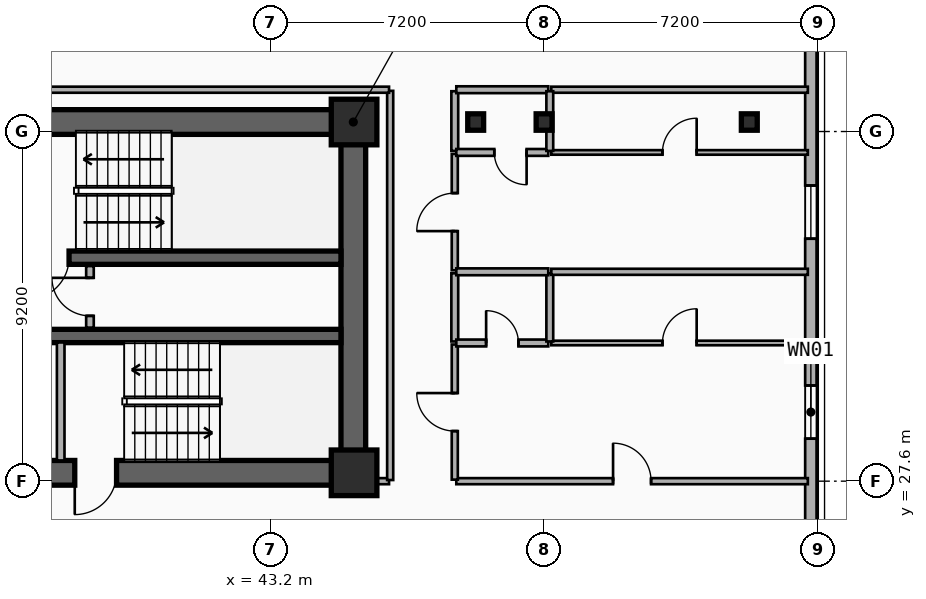
"""IFC4 building model, lengths in metres.
Left out: names, types, materials, properties, quantities, classifications, styles, units other than length and angle.
Written with IfcOpenShell. Run it as: python <this file> out.ifc"""

import sys

from ifc_helpers import new_model, si_unit, direction, frame, frame_2d, origin, origin_2d, place, context, subcontext, project, spatial, rectangle, i_section, extrude, element, fill, save


model = new_model("IFC4")
c1 = context("Model", 3, precision=1e-05, world=origin(), true_north=direction((0.0, 1.0)))
c2 = subcontext(c1, "Body", "Model", "MODEL_VIEW")
j1 = project(units=[si_unit("LENGTHUNIT", "METRE"), si_unit("PLANEANGLEUNIT", "RADIAN")], contexts=[c1])
p1 = place(None, origin())
s1 = spatial("IfcSite", under=j1, at=p1, CompositionType="ELEMENT")
p2 = place(p1, origin())
s2 = spatial("IfcBuilding", under=s1, at=p2, CompositionType="ELEMENT")
p3 = place(p2, frame((0.0, 0.0, 97.8)))
s3 = spatial("IfcBuildingStorey", under=s2, at=p3, CompositionType="ELEMENT", Elevation=97.8)
p4 = place(p3, frame((12.15, 37.05, 0.0), z_axis=(0.0, 0.0, 1.0), x_axis=(1.0, 0.0, 0.0)))
e1 = element("IfcWall", 1, at=p4, inside=s3, PredefinedType="SHEAR", context=c2, shape_type="SweptSolid", body=[
    extrude(rectangle(XDim=33.23, YDim=0.65, at=frame_2d((16.615, 0.0))), origin(), (0.0, 0.0, 1.0), 3.5),
])
p5 = place(p3, frame((45.38, 27.82, 0.0), z_axis=(0.0, 0.0, 1.0), x_axis=(-1.0, 0.0, 0.0)))
e2 = element("IfcWall", 2, at=p5, inside=s3, PredefinedType="SHEAR", context=c2, shape_type="SweptSolid", body=[
    extrude(rectangle(XDim=12.23, YDim=0.65, at=frame_2d((6.115, 0.0))), origin(), (0.0, 0.0, 1.0), 3.5),
])
p6 = place(p5, frame((9.93, 0.0, 0.0)))
e3 = element("IfcOpeningElement", 3, at=p6, cuts=e2, PredefinedType="OPENING", context=c2, shape_type="SweptSolid", body=[
    extrude(rectangle(XDim=1.1, YDim=2.15, at=frame_2d((0.55, 1.075))), frame((0.0, 0.335, 0.0), z_axis=(0.0, -1.0, 0.0), x_axis=(1.0, 0.0, 0.0)), (0.0, 0.0, 1.0), 0.67),
])
p7 = place(p5, frame((6.23, 0.0, 0.0)))
e4 = element("IfcOpeningElement", 4, at=p7, cuts=e2, PredefinedType="OPENING", context=c2, shape_type="SweptSolid", body=[
    extrude(rectangle(XDim=1.1, YDim=2.15, at=frame_2d((0.55, 1.075))), frame((0.0, 0.335, 0.0), z_axis=(0.0, -1.0, 0.0), x_axis=(1.0, 0.0, 0.0)), (0.0, 0.0, 1.0), 0.67),
])
p8 = place(p3, frame((45.38, 28.145, 0.0), z_axis=(0.0, 0.0, 1.0), x_axis=(0.0, 1.0, 0.0)))
e5 = element("IfcWall", 5, at=p8, inside=s3, PredefinedType="SHEAR", context=c2, shape_type="SweptSolid", body=[
    extrude(rectangle(XDim=8.58, YDim=0.65, at=frame_2d((4.29, 0.0))), origin(), (0.0, 0.0, 1.0), 3.5),
])
p9 = place(p3, frame((45.055, 33.48, 0.0), z_axis=(0.0, 0.0, 1.0), x_axis=(-1.0, 0.0, 0.0)))
e6 = element("IfcWall", 6, at=p9, inside=s3, PredefinedType="SHEAR", context=c2, shape_type="SweptSolid", body=[
    extrude(rectangle(XDim=8.5, YDim=0.35, at=frame_2d((4.25, 0.0))), origin(), (0.0, 0.0, 1.0), 3.5),
])
p10 = place(p9, frame((7.155, 0.0, 0.0)))
e7 = element("IfcOpeningElement", 7, at=p10, cuts=e6, PredefinedType="OPENING", context=c2, shape_type="SweptSolid", body=[
    extrude(rectangle(XDim=1.1, YDim=2.15, at=frame_2d((0.55, 1.075))), frame((0.0, 0.185, 0.0), z_axis=(0.0, -1.0, 0.0), x_axis=(1.0, 0.0, 0.0)), (0.0, 0.0, 1.0), 0.37),
])
p11 = place(p3, frame((36.555, 31.42, 0.0), z_axis=(0.0, 0.0, 1.0), x_axis=(1.0, 0.0, 0.0)))
e8 = element("IfcWall", 8, at=p11, inside=s3, PredefinedType="SHEAR", context=c2, shape_type="SweptSolid", body=[
    extrude(rectangle(XDim=8.5, YDim=0.35, at=frame_2d((4.25, 0.0))), origin(), (0.0, 0.0, 1.0), 3.5),
])
for number, where, z_axis, x_axis in (
    (9, (45.4, 27.82, 0.0), (0.0, 0.0, 1.0), (1.0, 0.0, 0.0)),
    (10, (45.4, 37.05, 0.0), (0.0, 0.0, 1.0), (1.0, 0.0, 0.0)),
):
    element("IfcColumn", number, at=place(p3, frame(where, z_axis=z_axis, x_axis=x_axis)), inside=s3, PredefinedType="COLUMN", context=c2, shape_type="SweptSolid", body=[
        extrude(rectangle(XDim=1.2, YDim=1.2, at=origin_2d()), origin(), (0.0, 0.0, 1.0), 3.5),
    ])
for number, where, z_axis, x_axis in (
    (11, (48.6, 37.05, 0.0), (0.0, 0.0, 1.0), (1.0, 0.0, 0.0)),
    (12, (50.4, 37.05, 0.0), (0.0, 0.0, 1.0), (1.0, 0.0, 0.0)),
    (13, (55.8, 37.05, 0.0), (0.0, 0.0, 1.0), (1.0, 0.0, 0.0)),
):
    element("IfcColumn", number, at=place(p3, frame(where, z_axis=z_axis, x_axis=x_axis)), inside=s3, PredefinedType="COLUMN", context=c2, shape_type="SweptSolid", body=[
        extrude(i_section(OverallWidth=0.418, OverallDepth=0.432, WebThickness=0.035, FlangeThickness=0.056, FilletRadius=0.015, at=origin_2d()), origin(), (0.0, 0.0, 1.0), 3.5),
    ])
p12 = place(p3, frame((57.42, 39.0, 0.0), z_axis=(0.0, 0.0, 1.0), x_axis=(0.0, -1.0, 0.0)))
e14 = element("IfcWall", 14, at=p12, inside=s3, PredefinedType="SOLIDWALL", context=c2, shape_type="SweptSolid", body=[
    extrude(rectangle(XDim=18.0, YDim=0.3, at=frame_2d((9.0, 0.0))), origin(), (0.0, 0.0, 1.0), 3.24),
])
p13 = place(p12, frame((8.882, 0.0, 0.48)))
e15 = element("IfcOpeningElement", 15, at=p13, cuts=e14, PredefinedType="OPENING", context=c2, shape_type="SweptSolid", body=[
    extrude(rectangle(XDim=1.4, YDim=1.8, at=frame_2d((0.7, 0.9))), frame((0.0, 0.16, 0.0), z_axis=(0.0, -1.0, 0.0), x_axis=(1.0, 0.0, 0.0)), (0.0, 0.0, 1.0), 0.32),
])
p14 = place(p12, frame((3.621, 0.0, 0.48)))
e16 = element("IfcOpeningElement", 16, at=p14, cuts=e14, PredefinedType="OPENING", context=c2, shape_type="SweptSolid", body=[
    extrude(rectangle(XDim=1.4, YDim=1.8, at=frame_2d((0.7, 0.9))), frame((0.0, 0.16, 0.0), z_axis=(0.0, -1.0, 0.0), x_axis=(1.0, 0.0, 0.0)), (0.0, 0.0, 1.0), 0.32),
])
p15 = place(p12, frame((16.28, 0.0, 0.65)))
e17 = element("IfcOpeningElement", 17, at=p15, cuts=e14, PredefinedType="OPENING", context=c2, shape_type="SweptSolid", body=[
    extrude(rectangle(XDim=1.4, YDim=1.8, at=frame_2d((0.7, 0.9))), frame((0.0, 0.16, 0.0), z_axis=(0.0, -1.0, 0.0), x_axis=(1.0, 0.0, 0.0)), (0.0, 0.0, 1.0), 0.32),
])
p16 = place(p3, frame((37.68, 28.145, 0.0), z_axis=(0.0, 0.0, 1.0), x_axis=(0.0, 1.0, 0.0)))
e18 = element("IfcWall", 18, at=p16, inside=s3, PredefinedType="PARTITIONING", context=c2, shape_type="SweptSolid", body=[
    extrude(rectangle(XDim=3.105, YDim=0.2, at=frame_2d((1.552, 0.0))), origin(), (0.0, 0.0, 1.0), 2.62),
])
p17 = place(p3, frame((38.45, 31.64, 0.0), z_axis=(0.0, 0.0, 1.0), x_axis=(0.0, 1.0, 0.0)))
e19 = element("IfcWall", 19, at=p17, inside=s3, PredefinedType="PARTITIONING", context=c2, shape_type="SweptSolid", body=[
    extrude(rectangle(XDim=1.62, YDim=0.2, at=frame_2d((0.81, 0.0))), origin(), (0.0, 0.0, 1.0), 3.24),
])
p18 = place(p17, frame((0.31, 0.0, 0.0)))
e20 = element("IfcOpeningElement", 20, at=p18, cuts=e19, PredefinedType="OPENING", context=c2, shape_type="SweptSolid", body=[
    extrude(rectangle(XDim=1.0, YDim=2.15, at=frame_2d((0.5, 1.075))), frame((0.0, 0.11, 0.0), z_axis=(0.0, -1.0, 0.0), x_axis=(1.0, 0.0, 0.0)), (0.0, 0.0, 1.0), 0.22),
])
p19 = place(p3, frame((48.09, 27.6, 0.0), z_axis=(0.0, 0.0, 1.0), x_axis=(1.0, 0.0, 0.0)))
e21 = element("IfcWall", 21, at=p19, inside=s3, PredefinedType="PARTITIONING", context=c2, shape_type="SweptSolid", body=[
    extrude(rectangle(XDim=9.25, YDim=0.16, at=frame_2d((4.625, 0.0))), origin(), (0.0, 0.0, 1.0), 2.57),
])
p20 = place(p19, frame((4.125, 0.0, 0.0)))
e22 = element("IfcOpeningElement", 22, at=p20, cuts=e21, PredefinedType="OPENING", context=c2, shape_type="SweptSolid", body=[
    extrude(rectangle(XDim=1.0, YDim=2.15, at=frame_2d((0.5, 1.075))), frame((0.0, 0.09, 0.0), z_axis=(0.0, -1.0, 0.0), x_axis=(1.0, 0.0, 0.0)), (0.0, 0.0, 1.0), 0.18),
])
p21 = place(p3, frame((48.05, 27.64, 0.0), z_axis=(0.0, 0.0, 1.0), x_axis=(0.0, 1.0, 0.0)))
e23 = element("IfcWall", 23, at=p21, inside=s3, PredefinedType="PARTITIONING", context=c2, shape_type="SweptSolid", body=[
    extrude(rectangle(XDim=3.556, YDim=0.16, at=frame_2d((1.778, 0.0))), origin(), (0.0, 0.0, 1.0), 3.24),
])
p22 = place(p21, frame((1.278, 0.0, 0.0)))
e24 = element("IfcOpeningElement", 24, at=p22, cuts=e23, PredefinedType="OPENING", context=c2, shape_type="SweptSolid", body=[
    extrude(rectangle(XDim=1.0, YDim=2.15, at=frame_2d((0.5, 1.075))), frame((0.0, 0.09, 0.0), z_axis=(0.0, -1.0, 0.0), x_axis=(1.0, 0.0, 0.0)), (0.0, 0.0, 1.0), 0.18),
])
p23 = place(p3, frame((48.05, 31.276, 0.0), z_axis=(0.0, 0.0, 1.0), x_axis=(0.0, 1.0, 0.0)))
e25 = element("IfcWall", 25, at=p23, inside=s3, PredefinedType="PLUMBINGWALL", context=c2, shape_type="SweptSolid", body=[
    extrude(rectangle(XDim=1.793, YDim=0.18, at=frame_2d((0.896, 0.0))), origin(), (0.0, 0.0, 1.0), 3.24),
])
p24 = place(p3, frame((48.05, 33.149, 0.0), z_axis=(0.0, 0.0, 1.0), x_axis=(0.0, 1.0, 0.0)))
e26 = element("IfcWall", 26, at=p24, inside=s3, PredefinedType="PARTITIONING", context=c2, shape_type="SweptSolid", body=[
    extrude(rectangle(XDim=3.061, YDim=0.16, at=frame_2d((1.531, 0.0))), origin(), (0.0, 0.0, 1.0), 3.24),
])
p25 = place(p24, frame((1.031, 0.0, 0.0)))
e27 = element("IfcOpeningElement", 27, at=p25, cuts=e26, PredefinedType="OPENING", context=c2, shape_type="SweptSolid", body=[
    extrude(rectangle(XDim=1.0, YDim=2.15, at=frame_2d((0.5, 1.075))), frame((0.0, 0.09, 0.0), z_axis=(0.0, -1.0, 0.0), x_axis=(1.0, 0.0, 0.0)), (0.0, 0.0, 1.0), 0.18),
])
p26 = place(p3, frame((48.05, 36.29, 0.0), z_axis=(0.0, 0.0, 1.0), x_axis=(0.0, 1.0, 0.0)))
e28 = element("IfcWall", 28, at=p26, inside=s3, PredefinedType="PLUMBINGWALL", context=c2, shape_type="SweptSolid", body=[
    extrude(rectangle(XDim=1.57, YDim=0.18, at=frame_2d((0.785, 0.0))), origin(), (0.0, 0.0, 1.0), 2.72),
])
p27 = place(p3, frame((48.09, 37.9, 0.0), z_axis=(0.0, 0.0, 1.0), x_axis=(1.0, 0.0, 0.0)))
e29 = element("IfcWall", 29, at=p27, inside=s3, PredefinedType="PLUMBINGWALL", context=c2, shape_type="SweptSolid", body=[
    extrude(rectangle(XDim=2.42, YDim=0.18, at=frame_2d((1.21, 0.0))), origin(), (0.0, 0.0, 1.0), 3.24),
])
p28 = place(p3, frame((50.59, 37.9, 0.0), z_axis=(0.0, 0.0, 1.0), x_axis=(1.0, 0.0, 0.0)))
e30 = element("IfcWall", 30, at=p28, inside=s3, PredefinedType="PARTITIONING", context=c2, shape_type="SweptSolid", body=[
    extrude(rectangle(XDim=6.75, YDim=0.16, at=frame_2d((3.375, 0.0))), origin(), (0.0, 0.0, 1.0), 3.24),
])
p29 = place(p3, frame((48.09, 31.236, 0.0), z_axis=(0.0, 0.0, 1.0), x_axis=(1.0, 0.0, 0.0)))
e31 = element("IfcWall", 31, at=p29, inside=s3, PredefinedType="PLUMBINGWALL", context=c2, shape_type="SweptSolid", body=[
    extrude(rectangle(XDim=2.42, YDim=0.18, at=frame_2d((1.21, 0.0))), origin(), (0.0, 0.0, 1.0), 2.57),
])
p30 = place(p29, frame((0.785, 0.0, 0.0)))
e32 = element("IfcOpeningElement", 32, at=p30, cuts=e31, PredefinedType="OPENING", context=c2, shape_type="SweptSolid", body=[
    extrude(rectangle(XDim=0.85, YDim=2.1, at=frame_2d((0.425, 1.05))), frame((0.0, 0.1, 0.0), z_axis=(0.0, -1.0, 0.0), x_axis=(1.0, 0.0, 0.0)), (0.0, 0.0, 1.0), 0.2),
])
p31 = place(p3, frame((50.59, 31.236, 0.0), z_axis=(0.0, 0.0, 1.0), x_axis=(1.0, 0.0, 0.0)))
e33 = element("IfcWall", 33, at=p31, inside=s3, PredefinedType="PARTITIONING", context=c2, shape_type="SweptSolid", body=[
    extrude(rectangle(XDim=6.75, YDim=0.12, at=frame_2d((3.375, 0.0))), origin(), (0.0, 0.0, 1.0), 2.57),
])
p32 = place(p31, frame((2.925, 0.0, 0.0)))
e34 = element("IfcOpeningElement", 34, at=p32, cuts=e33, PredefinedType="OPENING", context=c2, shape_type="SweptSolid", body=[
    extrude(rectangle(XDim=0.9, YDim=2.1, at=frame_2d((0.45, 1.05))), frame((0.0, 0.07, 0.0), z_axis=(0.0, -1.0, 0.0), x_axis=(1.0, 0.0, 0.0)), (0.0, 0.0, 1.0), 0.14),
])
p33 = place(p3, frame((50.55, 31.276, 0.0), z_axis=(0.0, 0.0, 1.0), x_axis=(0.0, 1.0, 0.0)))
e35 = element("IfcWall", 35, at=p33, inside=s3, PredefinedType="PLUMBINGWALL", context=c2, shape_type="SweptSolid", body=[
    extrude(rectangle(XDim=1.793, YDim=0.18, at=frame_2d((0.896, 0.0))), origin(), (0.0, 0.0, 1.0), 2.57),
])
p34 = place(p3, frame((48.09, 33.109, 0.0), z_axis=(0.0, 0.0, 1.0), x_axis=(1.0, 0.0, 0.0)))
e36 = element("IfcWall", 36, at=p34, inside=s3, PredefinedType="PLUMBINGWALL", context=c2, shape_type="SweptSolid", body=[
    extrude(rectangle(XDim=2.42, YDim=0.18, at=frame_2d((1.21, 0.0))), origin(), (0.0, 0.0, 1.0), 2.57),
])
p35 = place(p3, frame((50.59, 33.109, 0.0), z_axis=(0.0, 0.0, 1.0), x_axis=(1.0, 0.0, 0.0)))
e37 = element("IfcWall", 37, at=p35, inside=s3, PredefinedType="PARTITIONING", context=c2, shape_type="SweptSolid", body=[
    extrude(rectangle(XDim=6.75, YDim=0.16, at=frame_2d((3.375, 0.0))), origin(), (0.0, 0.0, 1.0), 2.57),
])
p36 = place(p3, frame((50.51, 36.25, 0.0), z_axis=(0.0, 0.0, 1.0), x_axis=(-1.0, 0.0, 0.0)))
e38 = element("IfcWall", 38, at=p36, inside=s3, PredefinedType="PLUMBINGWALL", context=c2, shape_type="SweptSolid", body=[
    extrude(rectangle(XDim=2.42, YDim=0.18, at=frame_2d((1.21, 0.0))), origin(), (0.0, 0.0, 1.0), 2.57),
])
p37 = place(p36, frame((0.57, 0.0, 0.0)))
e39 = element("IfcOpeningElement", 39, at=p37, cuts=e38, PredefinedType="OPENING", context=c2, shape_type="SweptSolid", body=[
    extrude(rectangle(XDim=0.85, YDim=2.1, at=frame_2d((0.425, 1.05))), frame((0.0, 0.1, 0.0), z_axis=(0.0, -1.0, 0.0), x_axis=(1.0, 0.0, 0.0)), (0.0, 0.0, 1.0), 0.2),
])
p38 = place(p3, frame((50.59, 36.25, 0.0), z_axis=(0.0, 0.0, 1.0), x_axis=(1.0, 0.0, 0.0)))
e40 = element("IfcWall", 40, at=p38, inside=s3, PredefinedType="PARTITIONING", context=c2, shape_type="SweptSolid", body=[
    extrude(rectangle(XDim=6.75, YDim=0.12, at=frame_2d((3.375, 0.0))), origin(), (0.0, 0.0, 1.0), 2.57),
])
p39 = place(p38, frame((2.925, 0.0, 0.0)))
e41 = element("IfcOpeningElement", 41, at=p39, cuts=e40, PredefinedType="OPENING", context=c2, shape_type="SweptSolid", body=[
    extrude(rectangle(XDim=0.9, YDim=2.1, at=frame_2d((0.45, 1.05))), frame((0.0, 0.07, 0.0), z_axis=(0.0, -1.0, 0.0), x_axis=(1.0, 0.0, 0.0)), (0.0, 0.0, 1.0), 0.14),
])
p40 = place(p3, frame((50.55, 36.29, 0.0), z_axis=(0.0, 0.0, 1.0), x_axis=(0.0, 1.0, 0.0)))
e42 = element("IfcWall", 42, at=p40, inside=s3, PredefinedType="PLUMBINGWALL", context=c2, shape_type="SweptSolid", body=[
    extrude(rectangle(XDim=1.57, YDim=0.18, at=frame_2d((0.785, 0.0))), origin(), (0.0, 0.0, 1.0), 2.57),
])
p41 = place(p3, frame((45.41, 27.6, 0.0), z_axis=(0.0, 0.0, 1.0), x_axis=(1.0, 0.0, 0.0)))
e43 = element("IfcWall", 43, at=p41, inside=s3, PredefinedType="PARTITIONING", context=c2, shape_type="SweptSolid", body=[
    extrude(rectangle(XDim=0.91, YDim=0.16, at=frame_2d((0.455, 0.0))), origin(), (0.0, 0.0, 1.0), 2.28),
])
p42 = place(p3, frame((46.35, 27.63, 0.0), z_axis=(0.0, 0.0, 1.0), x_axis=(0.0, 1.0, 0.0)))
e44 = element("IfcWall", 44, at=p42, inside=s3, PredefinedType="PARTITIONING", context=c2, shape_type="SweptSolid", body=[
    extrude(rectangle(XDim=10.24, YDim=0.16, at=frame_2d((5.12, 0.0))), origin(), (0.0, 0.0, 1.0), 2.72),
])
p43 = place(p3, frame((11.28, 37.9, 0.0), z_axis=(0.0, 0.0, 1.0), x_axis=(1.0, 0.0, 0.0)))
e45 = element("IfcWall", 45, at=p43, inside=s3, PredefinedType="PARTITIONING", context=c2, shape_type="SweptSolid", body=[
    extrude(rectangle(XDim=35.04, YDim=0.16, at=frame_2d((17.52, 0.0))), origin(), (0.0, 0.0, 1.0), 3.24),
])
p44 = place(p13, origin())
e46 = element("IfcWindow", 46, at=p44, inside=s3, PartitioningType="SINGLE_PANEL", PredefinedType="WINDOW", context=c2, shape_type="SweptSolid", body=[
    extrude(rectangle(XDim=1.4, YDim=1.8, at=frame_2d((0.7, 0.9))), frame((0.0, 0.03, 0.0), z_axis=(0.0, -1.0, 0.0), x_axis=(1.0, 0.0, 0.0)), (0.0, 0.0, 1.0), 0.06),
])
fill(e15, e46)
p45 = place(p14, origin())
e47 = element("IfcWindow", 47, at=p45, inside=s3, PartitioningType="SINGLE_PANEL", PredefinedType="WINDOW", context=c2, shape_type="SweptSolid", body=[
    extrude(rectangle(XDim=1.4, YDim=1.8, at=frame_2d((0.7, 0.9))), frame((0.0, 0.03, 0.0), z_axis=(0.0, -1.0, 0.0), x_axis=(1.0, 0.0, 0.0)), (0.0, 0.0, 1.0), 0.06),
])
fill(e16, e47)
p46 = place(p10, origin())
e48 = element("IfcDoor", 48, at=p46, inside=s3, OperationType="SINGLE_SWING_RIGHT", PredefinedType="DOOR", context=c2, shape_type="SweptSolid", body=[
    extrude(rectangle(XDim=1.1, YDim=2.15, at=frame_2d((0.55, 1.075))), frame((0.0, 0.025, 0.0), z_axis=(0.0, -1.0, 0.0), x_axis=(1.0, 0.0, 0.0)), (0.0, 0.0, 1.0), 0.05),
])
fill(e7, e48)
p47 = place(p7, origin())
e49 = element("IfcDoor", 49, at=p47, inside=s3, OperationType="SINGLE_SWING_RIGHT", PredefinedType="DOOR", context=c2, shape_type="SweptSolid", body=[
    extrude(rectangle(XDim=1.1, YDim=2.15, at=frame_2d((0.55, 1.075))), frame((0.0, 0.025, 0.0), z_axis=(0.0, -1.0, 0.0), x_axis=(1.0, 0.0, 0.0)), (0.0, 0.0, 1.0), 0.05),
])
fill(e4, e49)
p48 = place(p18, origin())
e50 = element("IfcDoor", 50, at=p48, inside=s3, OperationType="SINGLE_SWING_RIGHT", PredefinedType="DOOR", context=c2, shape_type="SweptSolid", body=[
    extrude(rectangle(XDim=1.0, YDim=2.15, at=frame_2d((0.5, 1.075))), frame((0.0, 0.025, 0.0), z_axis=(0.0, -1.0, 0.0), x_axis=(1.0, 0.0, 0.0)), (0.0, 0.0, 1.0), 0.05),
])
fill(e20, e50)
p49 = place(p20, origin())
e51 = element("IfcDoor", 51, at=p49, inside=s3, OperationType="SINGLE_SWING_LEFT", PredefinedType="DOOR", context=c2, shape_type="SweptSolid", body=[
    extrude(rectangle(XDim=1.0, YDim=2.15, at=frame_2d((0.5, 1.075))), frame((0.0, 0.025, 0.0), z_axis=(0.0, -1.0, 0.0), x_axis=(1.0, 0.0, 0.0)), (0.0, 0.0, 1.0), 0.05),
])
fill(e22, e51)
p50 = place(p22, origin())
e52 = element("IfcDoor", 52, at=p50, inside=s3, OperationType="SINGLE_SWING_RIGHT", PredefinedType="DOOR", context=c2, shape_type="SweptSolid", body=[
    extrude(rectangle(XDim=1.0, YDim=2.15, at=frame_2d((0.5, 1.075))), frame((0.0, 0.025, 0.0), z_axis=(0.0, -1.0, 0.0), x_axis=(1.0, 0.0, 0.0)), (0.0, 0.0, 1.0), 0.05),
])
fill(e24, e52)
p51 = place(p25, origin())
e53 = element("IfcDoor", 53, at=p51, inside=s3, OperationType="SINGLE_SWING_LEFT", PredefinedType="DOOR", context=c2, shape_type="SweptSolid", body=[
    extrude(rectangle(XDim=1.0, YDim=2.15, at=frame_2d((0.5, 1.075))), frame((0.0, 0.025, 0.0), z_axis=(0.0, -1.0, 0.0), x_axis=(1.0, 0.0, 0.0)), (0.0, 0.0, 1.0), 0.05),
])
fill(e27, e53)
p52 = place(p30, origin())
e54 = element("IfcDoor", 54, at=p52, inside=s3, OperationType="SINGLE_SWING_LEFT", PredefinedType="DOOR", context=c2, shape_type="SweptSolid", body=[
    extrude(rectangle(XDim=0.85, YDim=2.1, at=frame_2d((0.425, 1.05))), frame((0.0, 0.025, 0.0), z_axis=(0.0, -1.0, 0.0), x_axis=(1.0, 0.0, 0.0)), (0.0, 0.0, 1.0), 0.05),
])
fill(e32, e54)
p53 = place(p32, origin())
e55 = element("IfcDoor", 55, at=p53, inside=s3, OperationType="SINGLE_SWING_RIGHT", PredefinedType="DOOR", context=c2, shape_type="SweptSolid", body=[
    extrude(rectangle(XDim=0.9, YDim=2.1, at=frame_2d((0.45, 1.05))), frame((0.0, 0.025, 0.0), z_axis=(0.0, -1.0, 0.0), x_axis=(1.0, 0.0, 0.0)), (0.0, 0.0, 1.0), 0.05),
])
fill(e34, e55)
p54 = place(p37, origin())
e56 = element("IfcDoor", 56, at=p54, inside=s3, OperationType="SINGLE_SWING_LEFT", PredefinedType="DOOR", context=c2, shape_type="SweptSolid", body=[
    extrude(rectangle(XDim=0.85, YDim=2.1, at=frame_2d((0.425, 1.05))), frame((0.0, 0.025, 0.0), z_axis=(0.0, -1.0, 0.0), x_axis=(1.0, 0.0, 0.0)), (0.0, 0.0, 1.0), 0.05),
])
fill(e39, e56)
p55 = place(p39, origin())
e57 = element("IfcDoor", 57, at=p55, inside=s3, OperationType="SINGLE_SWING_RIGHT", PredefinedType="DOOR", context=c2, shape_type="SweptSolid", body=[
    extrude(rectangle(XDim=0.9, YDim=2.1, at=frame_2d((0.45, 1.05))), frame((0.0, 0.025, 0.0), z_axis=(0.0, -1.0, 0.0), x_axis=(1.0, 0.0, 0.0)), (0.0, 0.0, 1.0), 0.05),
])
fill(e41, e57)
save(model, sys.argv[1])
